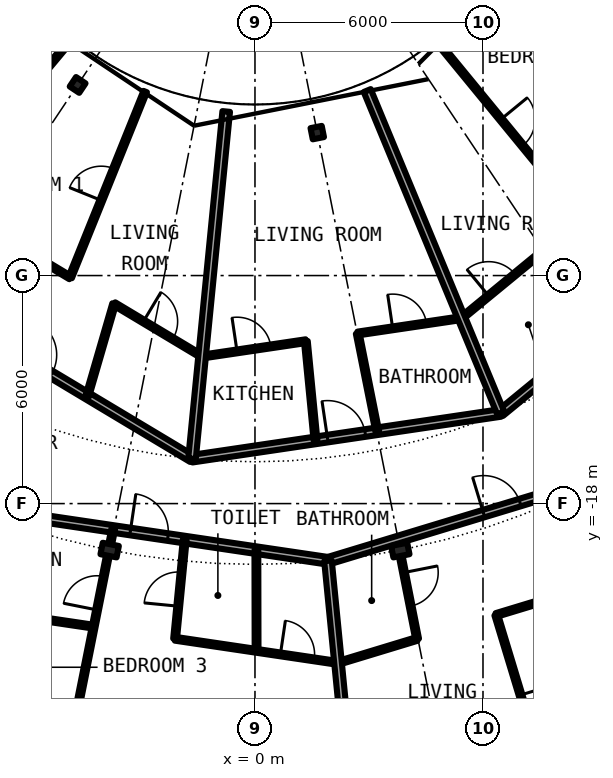
"""IFC4 building model, lengths in metres.
Left out: names, types, materials, properties, quantities, classifications, styles, units other than length and angle.
Written with IfcOpenShell. Run it as: python <this file> out.ifc"""

import sys

from ifc_helpers import new_model, si_unit, direction, frame, frame_2d, origin, origin_2d, place, context, subcontext, project, spatial, rectangle, i_section, extrude, element, fill, save


model = new_model("IFC4")
c1 = context("Model", 3, precision=1e-05, world=origin(), true_north=direction((0.0, 1.0)))
c2 = subcontext(c1, "Body", "Model", "MODEL_VIEW")
j1 = project(units=[si_unit("LENGTHUNIT", "METRE"), si_unit("PLANEANGLEUNIT", "RADIAN")], contexts=[c1])
p1 = place(None, origin())
s1 = spatial("IfcSite", under=j1, at=p1, CompositionType="ELEMENT")
p2 = place(p1, origin())
s2 = spatial("IfcBuilding", under=s1, at=p2, CompositionType="ELEMENT")
p3 = place(p2, frame((0.0, 0.0, 129.95)))
s3 = spatial("IfcBuildingStorey", under=s2, at=p3, CompositionType="ELEMENT", Elevation=129.95)
for number, where, z_axis, x_axis in (
    (1, (-3.824, -19.223, 0.0), (0.0, 0.0, 1.0), (-0.195, -0.981, 0.0)),
    (2, (3.824, -19.223, 0.0), (0.0, 0.0, 1.0), (0.195, -0.981, 0.0)),
):
    element("IfcColumn", number, at=place(p3, frame(where, z_axis=z_axis, x_axis=x_axis)), inside=s3, PredefinedType="COLUMN", context=c2, shape_type="SweptSolid", body=[
        extrude(i_section(OverallWidth=0.307, OverallDepth=0.432, WebThickness=0.021, FlangeThickness=0.04, FilletRadius=0.027, at=origin_2d()), origin(), (0.0, 0.0, 1.0), 3.05),
    ])
for number, where, z_axis, x_axis in (
    (3, (-4.667, -6.984, 0.0), (0.0, 0.0, 1.0), (-0.556, -0.831, 0.0)),
    (4, (1.639, -8.239, 0.0), (0.0, 0.0, 1.0), (0.195, -0.981, 0.0)),
):
    element("IfcColumn", number, at=place(p3, frame(where, z_axis=z_axis, x_axis=x_axis)), inside=s3, PredefinedType="COLUMN", context=c2, shape_type="SweptSolid", body=[
        extrude(i_section(OverallWidth=0.3, OverallDepth=0.3, WebThickness=0.011, FlangeThickness=0.019, FilletRadius=0.027, at=origin_2d()), origin(), (0.0, 0.0, 1.0), 3.05),
    ])
p4 = place(p3, frame((2.18, -22.195, 0.0), z_axis=(0.0, 0.0, 1.0), x_axis=(0.956838221976, 0.290621088303, 0.0)))
e5 = element("IfcWall", 5, at=p4, inside=s3, PredefinedType="PARTITIONING", context=c2, shape_type="SweptSolid", body=[
    extrude(rectangle(XDim=2.175, YDim=0.1, at=frame_2d((1.087, 0.0))), origin(), (0.0, 0.0, 1.0), 2.7),
])
p5 = place(p3, frame((6.346, -20.931, 0.0), z_axis=(0.0, 0.0, 1.0), x_axis=(0.956923957423, 0.290338663821, 0.0)))
e6 = element("IfcWall", 6, at=p5, inside=s3, PredefinedType="PARTITIONING", context=c2, shape_type="SweptSolid", body=[
    extrude(rectangle(XDim=4.357, YDim=0.1, at=frame_2d((2.178, 0.0))), origin(), (0.0, 0.0, 1.0), 2.7),
])
p6 = place(p5, frame((2.818, 0.0, 0.0)))
e7 = element("IfcOpeningElement", 7, at=p6, cuts=e6, PredefinedType="OPENING", context=c2, shape_type="SweptSolid", body=[
    extrude(rectangle(XDim=0.9, YDim=2.3, at=frame_2d((0.45, 1.15))), frame((0.0, 0.06, 0.0), z_axis=(0.0, -1.0, 0.0), x_axis=(1.0, 0.0, 0.0)), (0.0, 0.0, 1.0), 0.12),
])
p7 = place(p3, frame((-8.534, -20.603, 0.0), z_axis=(0.0, 0.0, 1.0), x_axis=(0.989178348771, -0.146718077695, 0.0)))
e8 = element("IfcWall", 8, at=p7, inside=s3, PredefinedType="PARTITIONING", context=c2, shape_type="SweptSolid", body=[
    extrude(rectangle(XDim=4.335, YDim=0.1, at=frame_2d((2.167, 0.0))), origin(), (0.0, 0.0, 1.0), 2.7),
])
p8 = place(p3, frame((-2.102, -21.557, 0.0), z_axis=(0.0, 0.0, 1.0), x_axis=(0.989171386505, -0.146765009863, 0.0)))
e9 = element("IfcWall", 9, at=p8, inside=s3, PredefinedType="PARTITIONING", context=c2, shape_type="SweptSolid", body=[
    extrude(rectangle(XDim=4.335, YDim=0.1, at=frame_2d((2.167, 0.0))), origin(), (0.0, 0.0, 1.0), 2.7),
])
p9 = place(p8, frame((2.801, 0.0, 0.0)))
e10 = element("IfcOpeningElement", 10, at=p9, cuts=e9, PredefinedType="OPENING", context=c2, shape_type="SweptSolid", body=[
    extrude(rectangle(XDim=0.9, YDim=2.3, at=frame_2d((0.45, 1.15))), frame((0.0, 0.06, 0.0), z_axis=(0.0, -1.0, 0.0), x_axis=(1.0, 0.0, 0.0)), (0.0, 0.0, 1.0), 0.12),
])
p10 = place(p3, frame((1.921, -19.506, 0.0), z_axis=(0.0, 0.0, 1.0), x_axis=(0.956929842753, 0.290319265721, 0.0)))
e11 = element("IfcWall", 11, at=p10, inside=s3, PredefinedType="PARTITIONING", context=c2, shape_type="SweptSolid", body=[
    extrude(rectangle(XDim=7.647, YDim=0.2, at=frame_2d((3.824, 0.0))), origin(), (0.0, 0.0, 1.0), 2.39),
])
p11 = place(p10, frame((4.28, 0.0, 0.0)))
e12 = element("IfcOpeningElement", 12, at=p11, cuts=e11, PredefinedType="OPENING", context=c2, shape_type="SweptSolid", body=[
    extrude(rectangle(XDim=1.0, YDim=2.3, at=frame_2d((0.5, 1.15))), frame((0.0, 0.11, 0.0), z_axis=(0.0, -1.0, 0.0), x_axis=(1.0, 0.0, 0.0)), (0.0, 0.0, 1.0), 0.22),
])
p12 = place(p3, frame((-7.495, -18.111, 0.0), z_axis=(0.0, 0.0, 1.0), x_axis=(0.989215286911, -0.146468823102, 0.0)))
e13 = element("IfcWall", 13, at=p12, inside=s3, PredefinedType="PARTITIONING", context=c2, shape_type="SweptSolid", body=[
    extrude(rectangle(XDim=9.531, YDim=0.2, at=frame_2d((4.766, 0.0))), origin(), (0.0, 0.0, 1.0), 2.39),
])
p13 = place(p12, frame((4.26, 0.0, 0.0)))
e14 = element("IfcOpeningElement", 14, at=p13, cuts=e13, PredefinedType="OPENING", context=c2, shape_type="SweptSolid", body=[
    extrude(rectangle(XDim=1.0, YDim=2.3, at=frame_2d((0.5, 1.15))), frame((0.0, 0.11, 0.0), z_axis=(0.0, -1.0, 0.0), x_axis=(1.0, 0.0, 0.0)), (0.0, 0.0, 1.0), 0.22),
])
p14 = place(p3, frame((-1.658, -16.819, 0.0), z_axis=(0.0, 0.0, 1.0), x_axis=(0.989191327347, 0.146630549004, 0.0)))
e15 = element("IfcWall", 15, at=p14, inside=s3, PredefinedType="PARTITIONING", context=c2, shape_type="SweptSolid", body=[
    extrude(rectangle(XDim=8.212, YDim=0.2, at=frame_2d((4.106, 0.0))), origin(), (0.0, 0.0, 1.0), 2.7),
])
p15 = place(p14, frame((3.607, 0.0, 0.0)))
e16 = element("IfcOpeningElement", 16, at=p15, cuts=e15, PredefinedType="OPENING", context=c2, shape_type="SweptSolid", body=[
    extrude(rectangle(XDim=1.0, YDim=2.3, at=frame_2d((0.5, 1.15))), frame((0.0, 0.11, 0.0), z_axis=(0.0, -1.0, 0.0), x_axis=(1.0, 0.0, 0.0)), (0.0, 0.0, 1.0), 0.22),
])
p16 = place(p3, frame((6.467, -15.614, 0.0), z_axis=(0.0, 0.0, 1.0), x_axis=(0.773074935257, 0.634314704605, 0.0)))
e17 = element("IfcWall", 17, at=p16, inside=s3, PredefinedType="PARTITIONING", context=c2, shape_type="SweptSolid", body=[
    extrude(rectangle(XDim=9.809, YDim=0.2, at=frame_2d((4.904, 0.0))), origin(), (0.0, 0.0, 1.0), 2.7),
])
p17 = place(p16, frame((4.407, 0.0, 0.0)))
e18 = element("IfcOpeningElement", 18, at=p17, cuts=e17, PredefinedType="OPENING", context=c2, shape_type="SweptSolid", body=[
    extrude(rectangle(XDim=1.0, YDim=2.3, at=frame_2d((0.5, 1.15))), frame((0.0, 0.11, 0.0), z_axis=(0.0, -1.0, 0.0), x_axis=(1.0, 0.0, 0.0)), (0.0, 0.0, 1.0), 0.22),
])
p18 = place(p3, frame((-12.674, -10.216, 0.0), z_axis=(0.0, 0.0, 1.0), x_axis=(0.857761135463, -0.514048474844, 0.0)))
e19 = element("IfcWall", 19, at=p18, inside=s3, PredefinedType="PARTITIONING", context=c2, shape_type="SweptSolid", body=[
    extrude(rectangle(XDim=12.845, YDim=0.2, at=frame_2d((6.423, 0.0))), origin(), (0.0, 0.0, 1.0), 2.7),
])
p19 = place(p18, frame((7.527, 0.0, 0.0)))
e20 = element("IfcOpeningElement", 20, at=p19, cuts=e19, PredefinedType="OPENING", context=c2, shape_type="SweptSolid", body=[
    extrude(rectangle(XDim=1.0, YDim=2.3, at=frame_2d((0.5, 1.15))), frame((0.0, 0.11, 0.0), z_axis=(0.0, -1.0, 0.0), x_axis=(1.0, 0.0, 0.0)), (0.0, 0.0, 1.0), 0.22),
])
p20 = place(p3, frame((-1.392, -14.132, 0.0), z_axis=(0.0, 0.0, 1.0), x_axis=(0.989182088026, 0.146692865293, 0.0)))
e21 = element("IfcWall", 21, at=p20, inside=s3, PredefinedType="PARTITIONING", context=c2, shape_type="SweptSolid", body=[
    extrude(rectangle(XDim=2.761, YDim=0.1, at=frame_2d((1.38, 0.0))), origin(), (0.0, 0.0, 1.0), 2.7),
])
p21 = place(p20, frame((0.93, 0.0, 0.0)))
e22 = element("IfcOpeningElement", 22, at=p21, cuts=e21, PredefinedType="OPENING", context=c2, shape_type="SweptSolid", body=[
    extrude(rectangle(XDim=0.9, YDim=2.3, at=frame_2d((0.45, 1.15))), frame((0.0, 0.06, 0.0), z_axis=(0.0, -1.0, 0.0), x_axis=(1.0, 0.0, 0.0)), (0.0, 0.0, 1.0), 0.12),
])
p22 = place(p3, frame((2.703, -13.525, 0.0), z_axis=(0.0, 0.0, 1.0), x_axis=(0.98918730894, 0.146657655211, 0.0)))
e23 = element("IfcWall", 23, at=p22, inside=s3, PredefinedType="PARTITIONING", context=c2, shape_type="SweptSolid", body=[
    extrude(rectangle(XDim=2.76, YDim=0.1, at=frame_2d((1.38, 0.0))), origin(), (0.0, 0.0, 1.0), 2.7),
])
p23 = place(p22, frame((0.931, 0.0, 0.0)))
e24 = element("IfcOpeningElement", 24, at=p23, cuts=e23, PredefinedType="OPENING", context=c2, shape_type="SweptSolid", body=[
    extrude(rectangle(XDim=0.9, YDim=2.3, at=frame_2d((0.45, 1.15))), frame((0.0, 0.06, 0.0), z_axis=(0.0, -1.0, 0.0), x_axis=(1.0, 0.0, 0.0)), (0.0, 0.0, 1.0), 0.12),
])
p24 = place(p3, frame((5.44, -13.117, 0.0), z_axis=(0.0, 0.0, 1.0), x_axis=(0.772732480827, 0.634731843439, 0.0)))
e25 = element("IfcWall", 25, at=p24, inside=s3, PredefinedType="PARTITIONING", context=c2, shape_type="SweptSolid", body=[
    extrude(rectangle(XDim=2.748, YDim=0.1, at=frame_2d((1.374, 0.0))), origin(), (0.0, 0.0, 1.0), 2.7),
])
p25 = place(p24, frame((0.918, 0.0, 0.0)))
e26 = element("IfcOpeningElement", 26, at=p25, cuts=e25, PredefinedType="OPENING", context=c2, shape_type="SweptSolid", body=[
    extrude(rectangle(XDim=0.9, YDim=2.3, at=frame_2d((0.45, 1.15))), frame((0.0, 0.06, 0.0), z_axis=(0.0, -1.0, 0.0), x_axis=(1.0, 0.0, 0.0)), (0.0, 0.0, 1.0), 0.12),
])
p26 = place(p3, frame((-9.621, -9.199, 0.0), z_axis=(0.0, 0.0, 1.0), x_axis=(0.857698539053, -0.514152911211, 0.0)))
e27 = element("IfcWall", 27, at=p26, inside=s3, PredefinedType="PARTITIONING", context=c2, shape_type="SweptSolid", body=[
    extrude(rectangle(XDim=5.551, YDim=0.1, at=frame_2d((2.775, 0.0))), origin(), (0.0, 0.0, 1.0), 2.7),
])
p27 = place(p3, frame((-3.702, -12.747, 0.0), z_axis=(0.0, 0.0, 1.0), x_axis=(0.85772440305, -0.514109763001, 0.0)))
e28 = element("IfcWall", 28, at=p27, inside=s3, PredefinedType="PARTITIONING", context=c2, shape_type="SweptSolid", body=[
    extrude(rectangle(XDim=2.698, YDim=0.1, at=frame_2d((1.349, 0.0))), origin(), (0.0, 0.0, 1.0), 2.7),
])
p28 = place(p27, frame((0.894, 0.0, 0.0)))
e29 = element("IfcOpeningElement", 29, at=p28, cuts=e28, PredefinedType="OPENING", context=c2, shape_type="SweptSolid", body=[
    extrude(rectangle(XDim=0.9, YDim=2.3, at=frame_2d((0.45, 1.15))), frame((0.0, 0.06, 0.0), z_axis=(0.0, -1.0, 0.0), x_axis=(1.0, 0.0, 0.0)), (0.0, 0.0, 1.0), 0.12),
])
p29 = place(p3, frame((-8.335, -9.97, 0.0), z_axis=(0.0, 0.0, 1.0), x_axis=(0.641376424834, 0.767226356213, 0.0)))
e30 = element("IfcWall", 30, at=p29, inside=s3, PredefinedType="PARTITIONING", context=c2, shape_type="SweptSolid", body=[
    extrude(rectangle(XDim=5.275, YDim=0.1, at=frame_2d((2.637, 0.0))), origin(), (0.0, 0.0, 1.0), 2.7),
])
p30 = place(p29, frame((2.187, 0.0, 0.0)))
e31 = element("IfcOpeningElement", 31, at=p30, cuts=e30, PredefinedType="OPENING", context=c2, shape_type="SweptSolid", body=[
    extrude(rectangle(XDim=0.9, YDim=2.3, at=frame_2d((0.45, 1.15))), frame((0.0, 0.06, 0.0), z_axis=(0.0, -1.0, 0.0), x_axis=(1.0, 0.0, 0.0)), (0.0, 0.0, 1.0), 0.12),
])
p31 = place(p3, frame((-5.324, -26.649, 0.0), z_axis=(0.0, 0.0, 1.0), x_axis=(0.195918370415, 0.980620207896, 0.0)))
e32 = element("IfcWall", 32, at=p31, inside=s3, PredefinedType="PARTITIONING", context=c2, shape_type="SweptSolid", body=[
    extrude(rectangle(XDim=7.36, YDim=0.1, at=frame_2d((3.68, 0.0))), origin(), (0.0, 0.0, 1.0), 2.7),
])
p32 = place(p31, frame((5.966, 0.0, 0.0)))
e33 = element("IfcOpeningElement", 33, at=p32, cuts=e32, PredefinedType="OPENING", context=c2, shape_type="SweptSolid", body=[
    extrude(rectangle(XDim=0.9, YDim=2.3, at=frame_2d((0.45, 1.15))), frame((0.0, 0.06, 0.0), z_axis=(0.0, -1.0, 0.0), x_axis=(1.0, 0.0, 0.0)), (0.0, 0.0, 1.0), 0.12),
])
p33 = place(p31, frame((2.308, 0.0, 0.0)))
e34 = element("IfcOpeningElement", 34, at=p33, cuts=e32, PredefinedType="OPENING", context=c2, shape_type="SweptSolid", body=[
    extrude(rectangle(XDim=0.9, YDim=2.3, at=frame_2d((0.45, 1.15))), frame((0.0, 0.06, 0.0), z_axis=(0.0, -1.0, 0.0), x_axis=(1.0, 0.0, 0.0)), (0.0, 0.0, 1.0), 0.12),
])
p34 = place(p3, frame((-4.864, -12.051, 0.0), z_axis=(0.0, 0.0, 1.0), x_axis=(0.374372761824, 0.927278294367, 0.0)))
e35 = element("IfcWall", 35, at=p34, inside=s3, PredefinedType="PARTITIONING", context=c2, shape_type="SweptSolid", body=[
    extrude(rectangle(XDim=5.276, YDim=0.1, at=frame_2d((2.638, 0.0))), origin(), (0.0, 0.0, 1.0), 2.7),
])
p35 = place(p34, frame((2.188, 0.0, 0.0)))
e36 = element("IfcOpeningElement", 36, at=p35, cuts=e35, PredefinedType="OPENING", context=c2, shape_type="SweptSolid", body=[
    extrude(rectangle(XDim=0.9, YDim=2.3, at=frame_2d((0.45, 1.15))), frame((0.0, 0.06, 0.0), z_axis=(0.0, -1.0, 0.0), x_axis=(1.0, 0.0, 0.0)), (0.0, 0.0, 1.0), 0.12),
])
p36 = place(p3, frame((-4.411, -15.168, 0.0), z_axis=(0.0, 0.0, 1.0), x_axis=(0.279201466266, 0.960232545395, 0.0)))
e37 = element("IfcWall", 37, at=p36, inside=s3, PredefinedType="PARTITIONING", context=c2, shape_type="SweptSolid", body=[
    extrude(rectangle(XDim=2.524, YDim=0.1, at=frame_2d((1.262, 0.0))), origin(), (0.0, 0.0, 1.0), 2.7),
])
p37 = place(p3, frame((-3.797, -19.008, 0.0), z_axis=(0.0, 0.0, 1.0), x_axis=(0.196386856719, 0.980526492507, 0.0)))
e38 = element("IfcWall", 38, at=p37, inside=s3, PredefinedType="PARTITIONING", context=c2, shape_type="SweptSolid", body=[
    extrude(rectangle(XDim=0.347, YDim=0.1, at=frame_2d((0.173, 0.0))), origin(), (0.0, 0.0, 1.0), 2.7),
])
p38 = place(p3, frame((-2.102, -21.557, 0.0), z_axis=(0.0, 0.0, 1.0), x_axis=(0.096922256818, 0.995291955224, 0.0)))
e39 = element("IfcWall", 39, at=p38, inside=s3, PredefinedType="PARTITIONING", context=c2, shape_type="SweptSolid", body=[
    extrude(rectangle(XDim=2.622, YDim=0.1, at=frame_2d((1.311, 0.0))), origin(), (0.0, 0.0, 1.0), 2.7),
])
p39 = place(p38, frame((0.861, 0.0, 0.0)))
e40 = element("IfcOpeningElement", 40, at=p39, cuts=e39, PredefinedType="OPENING", context=c2, shape_type="SweptSolid", body=[
    extrude(rectangle(XDim=0.9, YDim=2.3, at=frame_2d((0.45, 1.15))), frame((0.0, 0.06, 0.0), z_axis=(0.0, -1.0, 0.0), x_axis=(1.0, 0.0, 0.0)), (0.0, 0.0, 1.0), 0.12),
])
p40 = place(p3, frame((-1.657, -16.819, 0.0), z_axis=(0.0, 0.0, 1.0), x_axis=(0.098026443043, 0.995183810391, 0.0)))
e41 = element("IfcWall", 41, at=p40, inside=s3, PredefinedType="PARTITIONING", context=c2, shape_type="SweptSolid", body=[
    extrude(rectangle(XDim=9.18, YDim=0.2, at=frame_2d((4.59, 0.0))), origin(), (0.0, 0.0, 1.0), 2.7),
])
p41 = place(p3, frame((0.042, -21.875, 0.0), z_axis=(0.0, 0.0, 1.0), x_axis=(-0.001843314841, 0.999998301094, 0.0)))
e42 = element("IfcWall", 42, at=p41, inside=s3, PredefinedType="PARTITIONING", context=c2, shape_type="SweptSolid", body=[
    extrude(rectangle(XDim=2.649, YDim=0.1, at=frame_2d((1.324, 0.0))), origin(), (0.0, 0.0, 1.0), 2.7),
])
p42 = place(p3, frame((1.339, -13.727, 0.0), z_axis=(0.0, 0.0, 1.0), x_axis=(0.096830025237, -0.995300932489, 0.0)))
e43 = element("IfcWall", 43, at=p42, inside=s3, PredefinedType="PARTITIONING", context=c2, shape_type="SweptSolid", body=[
    extrude(rectangle(XDim=2.622, YDim=0.1, at=frame_2d((1.311, 0.0))), origin(), (0.0, 0.0, 1.0), 2.7),
])
p43 = place(p3, frame((1.921, -19.506, 0.0), z_axis=(0.0, 0.0, 1.0), x_axis=(0.098115395479, -0.995175044487, 0.0)))
e44 = element("IfcWall", 44, at=p43, inside=s3, PredefinedType="PARTITIONING", context=c2, shape_type="SweptSolid", body=[
    extrude(rectangle(XDim=7.574, YDim=0.2, at=frame_2d((3.787, 0.0))), origin(), (0.0, 0.0, 1.0), 2.7),
])
p44 = place(p3, frame((2.704, -13.524, 0.0), z_axis=(0.0, 0.0, 1.0), x_axis=(0.195937128464, -0.980616460034, 0.0)))
e45 = element("IfcWall", 45, at=p44, inside=s3, PredefinedType="PARTITIONING", context=c2, shape_type="SweptSolid", body=[
    extrude(rectangle(XDim=2.623, YDim=0.1, at=frame_2d((1.312, 0.0))), origin(), (0.0, 0.0, 1.0), 2.7),
])
p45 = place(p3, frame((2.954, -7.132, 0.0), z_axis=(0.0, 0.0, 1.0), x_axis=(0.382646942224, -0.923894646378, 0.0)))
e46 = element("IfcWall", 46, at=p45, inside=s3, PredefinedType="PARTITIONING", context=c2, shape_type="SweptSolid", body=[
    extrude(rectangle(XDim=9.181, YDim=0.2, at=frame_2d((4.59, 0.0))), origin(), (0.0, 0.0, 1.0), 2.7),
])
p46 = place(p3, frame((3.847, -19.439, 0.0), z_axis=(0.0, 0.0, 1.0), x_axis=(0.194227580483, -0.980956495967, 0.0)))
e47 = element("IfcWall", 47, at=p46, inside=s3, PredefinedType="PARTITIONING", context=c2, shape_type="SweptSolid", body=[
    extrude(rectangle(XDim=2.163, YDim=0.1, at=frame_2d((1.082, 0.0))), origin(), (0.0, 0.0, 1.0), 2.7),
])
p47 = place(p46, frame((0.383, 0.0, 0.0)))
e48 = element("IfcOpeningElement", 48, at=p47, cuts=e47, PredefinedType="OPENING", context=c2, shape_type="SweptSolid", body=[
    extrude(rectangle(XDim=0.9, YDim=2.3, at=frame_2d((0.45, 1.15))), frame((0.0, 0.06, 0.0), z_axis=(0.0, -1.0, 0.0), x_axis=(1.0, 0.0, 0.0)), (0.0, 0.0, 1.0), 0.12),
])
p48 = place(p3, frame((4.898, -5.968, 0.0), z_axis=(0.0, 0.0, 1.0), x_axis=(0.634358693064, -0.773038840249, 0.0)))
e49 = element("IfcWall", 49, at=p48, inside=s3, PredefinedType="PARTITIONING", context=c2, shape_type="SweptSolid", body=[
    extrude(rectangle(XDim=5.868, YDim=0.1, at=frame_2d((2.934, 0.0))), origin(), (0.0, 0.0, 1.0), 2.7),
])
p49 = place(p48, frame((2.484, 0.0, 0.0)))
e50 = element("IfcOpeningElement", 50, at=p49, cuts=e49, PredefinedType="OPENING", context=c2, shape_type="SweptSolid", body=[
    extrude(rectangle(XDim=0.9, YDim=2.3, at=frame_2d((0.45, 1.15))), frame((0.0, 0.06, 0.0), z_axis=(0.0, -1.0, 0.0), x_axis=(1.0, 0.0, 0.0)), (0.0, 0.0, 1.0), 0.12),
])
p50 = place(p3, frame((6.349, -20.93, 0.0), z_axis=(0.0, 0.0, 1.0), x_axis=(0.290172218727, -0.956974442438, 0.0)))
e51 = element("IfcWall", 51, at=p50, inside=s3, PredefinedType="PARTITIONING", context=c2, shape_type="SweptSolid", body=[
    extrude(rectangle(XDim=5.303, YDim=0.1, at=frame_2d((2.652, 0.0))), origin(), (0.0, 0.0, 1.0), 2.7),
])
p51 = place(p50, frame((2.202, 0.0, 0.0)))
e52 = element("IfcOpeningElement", 52, at=p51, cuts=e51, PredefinedType="OPENING", context=c2, shape_type="SweptSolid", body=[
    extrude(rectangle(XDim=0.9, YDim=2.3, at=frame_2d((0.45, 1.15))), frame((0.0, 0.06, 0.0), z_axis=(0.0, -1.0, 0.0), x_axis=(1.0, 0.0, 0.0)), (0.0, 0.0, 1.0), 0.12),
])
p52 = place(p13, origin())
e53 = element("IfcDoor", 53, at=p52, inside=s3, OperationType="SINGLE_SWING_LEFT", PredefinedType="DOOR", context=c2, shape_type="SweptSolid", body=[
    extrude(rectangle(XDim=1.0, YDim=2.3, at=frame_2d((0.5, 1.15))), frame((0.0, 0.025, 0.0), z_axis=(0.0, -1.0, 0.0), x_axis=(1.0, 0.0, 0.0)), (0.0, 0.0, 1.0), 0.05),
])
fill(e14, e53)
p53 = place(p9, origin())
e54 = element("IfcDoor", 54, at=p53, inside=s3, OperationType="SINGLE_SWING_RIGHT", PredefinedType="DOOR", context=c2, shape_type="SweptSolid", body=[
    extrude(rectangle(XDim=0.9, YDim=2.3, at=frame_2d((0.45, 1.15))), frame((0.0, 0.025, 0.0), z_axis=(0.0, -1.0, 0.0), x_axis=(1.0, 0.0, 0.0)), (0.0, 0.0, 1.0), 0.05),
])
fill(e10, e54)
p54 = place(p39, origin())
e55 = element("IfcDoor", 55, at=p54, inside=s3, OperationType="SINGLE_SWING_LEFT", PredefinedType="DOOR", context=c2, shape_type="SweptSolid", body=[
    extrude(rectangle(XDim=0.9, YDim=2.3, at=frame_2d((0.45, 1.15))), frame((0.0, 0.025, 0.0), z_axis=(0.0, -1.0, 0.0), x_axis=(1.0, 0.0, 0.0)), (0.0, 0.0, 1.0), 0.05),
])
fill(e40, e55)
p55 = place(p32, origin())
e56 = element("IfcDoor", 56, at=p55, inside=s3, OperationType="SINGLE_SWING_RIGHT", PredefinedType="DOOR", context=c2, shape_type="SweptSolid", body=[
    extrude(rectangle(XDim=0.9, YDim=2.3, at=frame_2d((0.45, 1.15))), frame((0.0, 0.025, 0.0), z_axis=(0.0, -1.0, 0.0), x_axis=(1.0, 0.0, 0.0)), (0.0, 0.0, 1.0), 0.05),
])
fill(e33, e56)
p56 = place(p11, origin())
e57 = element("IfcDoor", 57, at=p56, inside=s3, OperationType="SINGLE_SWING_RIGHT", PredefinedType="DOOR", context=c2, shape_type="SweptSolid", body=[
    extrude(rectangle(XDim=1.0, YDim=2.3, at=frame_2d((0.5, 1.15))), frame((0.0, 0.025, 0.0), z_axis=(0.0, -1.0, 0.0), x_axis=(1.0, 0.0, 0.0)), (0.0, 0.0, 1.0), 0.05),
])
fill(e12, e57)
p57 = place(p47, origin())
e58 = element("IfcDoor", 58, at=p57, inside=s3, OperationType="SINGLE_SWING_LEFT", PredefinedType="DOOR", context=c2, shape_type="SweptSolid", body=[
    extrude(rectangle(XDim=0.9, YDim=2.3, at=frame_2d((0.45, 1.15))), frame((0.0, 0.025, 0.0), z_axis=(0.0, -1.0, 0.0), x_axis=(1.0, 0.0, 0.0)), (0.0, 0.0, 1.0), 0.05),
])
fill(e48, e58)
p58 = place(p51, origin())
e59 = element("IfcDoor", 59, at=p58, inside=s3, OperationType="SINGLE_SWING_RIGHT", PredefinedType="DOOR", context=c2, shape_type="SweptSolid", body=[
    extrude(rectangle(XDim=0.9, YDim=2.3, at=frame_2d((0.45, 1.15))), frame((0.0, 0.025, 0.0), z_axis=(0.0, -1.0, 0.0), x_axis=(1.0, 0.0, 0.0)), (0.0, 0.0, 1.0), 0.05),
])
fill(e52, e59)
p59 = place(p28, origin())
e60 = element("IfcDoor", 60, at=p59, inside=s3, OperationType="SINGLE_SWING_LEFT", PredefinedType="DOOR", context=c2, shape_type="SweptSolid", body=[
    extrude(rectangle(XDim=0.9, YDim=2.3, at=frame_2d((0.45, 1.15))), frame((0.0, 0.025, 0.0), z_axis=(0.0, -1.0, 0.0), x_axis=(1.0, 0.0, 0.0)), (0.0, 0.0, 1.0), 0.05),
])
fill(e29, e60)
p60 = place(p35, origin())
e61 = element("IfcDoor", 61, at=p60, inside=s3, OperationType="SINGLE_SWING_RIGHT", PredefinedType="DOOR", context=c2, shape_type="SweptSolid", body=[
    extrude(rectangle(XDim=0.9, YDim=2.3, at=frame_2d((0.45, 1.15))), frame((0.0, 0.025, 0.0), z_axis=(0.0, -1.0, 0.0), x_axis=(1.0, 0.0, 0.0)), (0.0, 0.0, 1.0), 0.05),
])
fill(e36, e61)
p61 = place(p15, origin())
e62 = element("IfcDoor", 62, at=p61, inside=s3, OperationType="SINGLE_SWING_RIGHT", PredefinedType="DOOR", context=c2, shape_type="SweptSolid", body=[
    extrude(rectangle(XDim=1.0, YDim=2.3, at=frame_2d((0.5, 1.15))), frame((0.0, 0.025, 0.0), z_axis=(0.0, -1.0, 0.0), x_axis=(1.0, 0.0, 0.0)), (0.0, 0.0, 1.0), 0.05),
])
fill(e16, e62)
p62 = place(p23, origin())
e63 = element("IfcDoor", 63, at=p62, inside=s3, OperationType="SINGLE_SWING_RIGHT", PredefinedType="DOOR", context=c2, shape_type="SweptSolid", body=[
    extrude(rectangle(XDim=0.9, YDim=2.3, at=frame_2d((0.45, 1.15))), frame((0.0, 0.025, 0.0), z_axis=(0.0, -1.0, 0.0), x_axis=(1.0, 0.0, 0.0)), (0.0, 0.0, 1.0), 0.05),
])
fill(e24, e63)
p63 = place(p21, origin())
e64 = element("IfcDoor", 64, at=p63, inside=s3, OperationType="SINGLE_SWING_LEFT", PredefinedType="DOOR", context=c2, shape_type="SweptSolid", body=[
    extrude(rectangle(XDim=0.9, YDim=2.3, at=frame_2d((0.45, 1.15))), frame((0.0, 0.025, 0.0), z_axis=(0.0, -1.0, 0.0), x_axis=(1.0, 0.0, 0.0)), (0.0, 0.0, 1.0), 0.05),
])
fill(e22, e64)
p64 = place(p25, origin())
e65 = element("IfcDoor", 65, at=p64, inside=s3, OperationType="SINGLE_SWING_LEFT", PredefinedType="DOOR", context=c2, shape_type="SweptSolid", body=[
    extrude(rectangle(XDim=0.9, YDim=2.3, at=frame_2d((0.45, 1.15))), frame((0.0, 0.025, 0.0), z_axis=(0.0, -1.0, 0.0), x_axis=(1.0, 0.0, 0.0)), (0.0, 0.0, 1.0), 0.05),
])
fill(e26, e65)
p65 = place(p49, origin())
e66 = element("IfcDoor", 66, at=p65, inside=s3, OperationType="SINGLE_SWING_LEFT", PredefinedType="DOOR", context=c2, shape_type="SweptSolid", body=[
    extrude(rectangle(XDim=0.9, YDim=2.3, at=frame_2d((0.45, 1.15))), frame((0.0, 0.025, 0.0), z_axis=(0.0, -1.0, 0.0), x_axis=(1.0, 0.0, 0.0)), (0.0, 0.0, 1.0), 0.05),
])
fill(e50, e66)
save(model, sys.argv[1])
